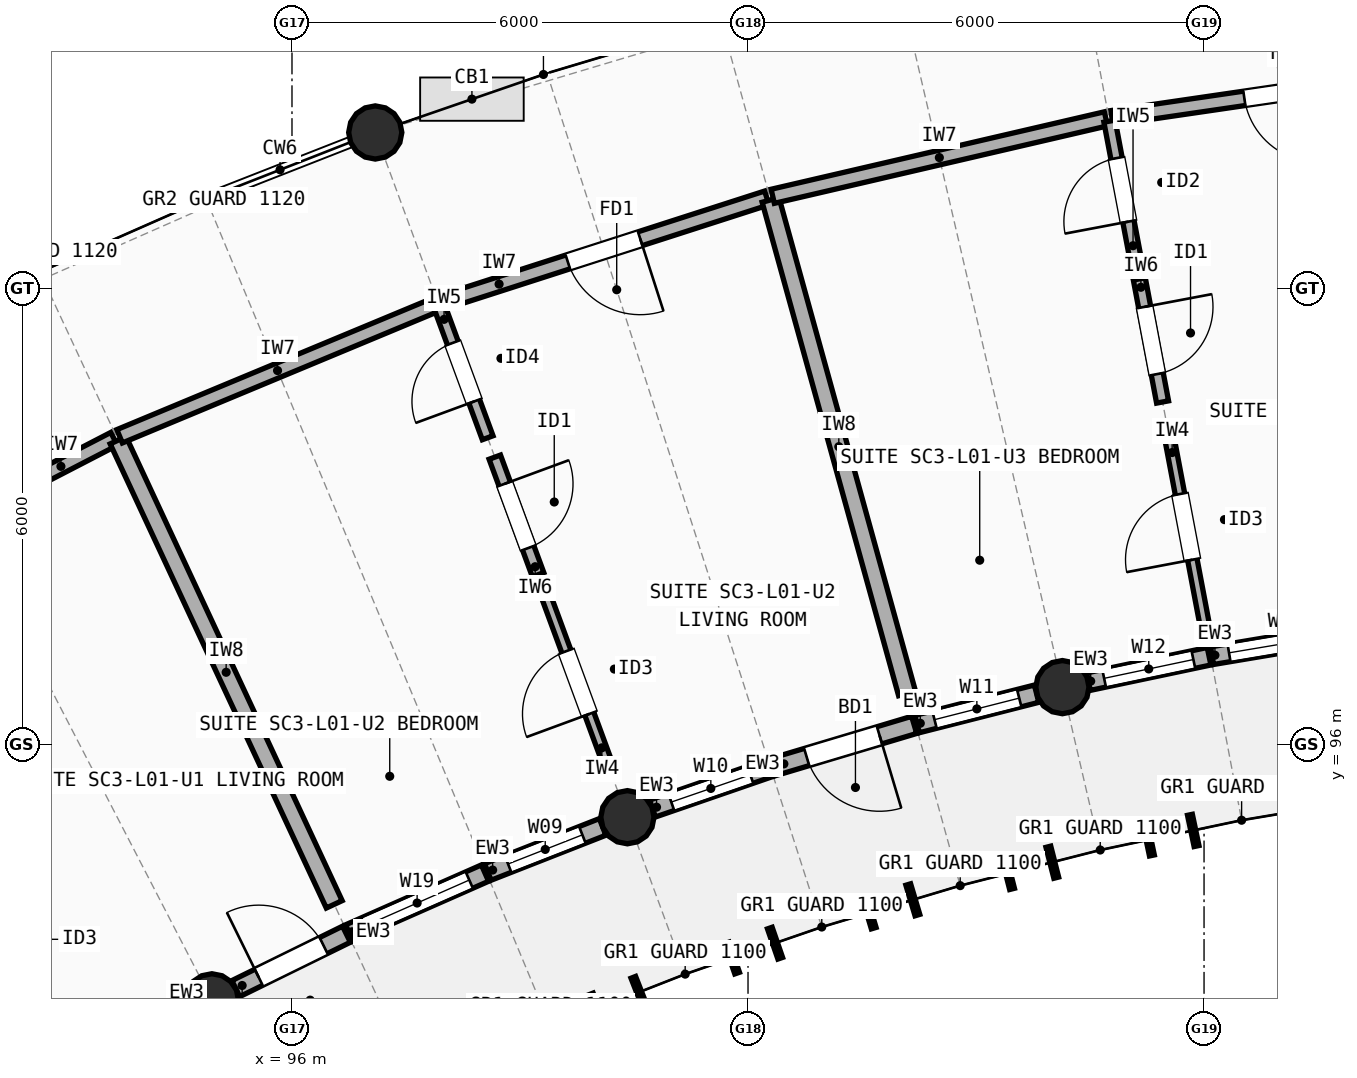
"""IFC4 building model, lengths in metres.
Left out: names, types, materials, properties, quantities, classifications, styles, units other than length and angle.
Written with IfcOpenShell. Run it as: python <this file> out.ifc"""

import sys

from ifc_helpers import new_model, si_unit, direction, frame, frame_2d, origin, origin_2d, place, context, subcontext, project, spatial, rectangle, circle, extrude, element, fill, save


model = new_model("IFC4")
c1 = context("Model", 3, precision=1e-05, world=origin(), true_north=direction((0.0, 1.0)))
c2 = subcontext(c1, "Body", "Model", "MODEL_VIEW")
j1 = project(units=[si_unit("LENGTHUNIT", "METRE"), si_unit("PLANEANGLEUNIT", "RADIAN")], contexts=[c1])
p1 = place(None, origin())
s1 = spatial("IfcSite", under=j1, at=p1, CompositionType="ELEMENT")
p2 = place(p1, origin())
s2 = spatial("IfcBuilding", under=s1, at=p2, CompositionType="ELEMENT")
p3 = place(p2, frame((0.0, 0.0, 4.5)))
s3 = spatial("IfcBuildingStorey", under=s2, at=p3, CompositionType="ELEMENT", Elevation=4.5)
for number, where, z_axis, x_axis in (
    (1, (94.947, 92.634, 0.0), (0.0, 0.0, 1.0), (1.0, 0.0, 0.0)),
    (2, (100.413, 95.043, 0.0), (0.0, 0.0, 1.0), (1.0, 0.0, 0.0)),
    (3, (97.095, 104.052, 0.0), (0.0, 0.0, 1.0), (1.0, 0.0, 0.0)),
    (4, (106.136, 96.754, 0.0), (0.0, 0.0, 1.0), (1.0, 0.0, 0.0)),
):
    element("IfcColumn", number, at=place(p3, frame(where, z_axis=z_axis, x_axis=x_axis)), inside=s3, PredefinedType="COLUMN", context=c2, shape_type="SweptSolid", body=[
        extrude(circle(Radius=0.35, at=origin_2d()), origin(), (0.0, 0.0, 1.0), 2.948),
    ])
p4 = place(p3, frame((95.261, 92.788, 0.0), z_axis=(0.0, 0.0, 1.0), x_axis=(0.897535518759, 0.440942164649, 0.0)))
e5 = element("IfcWall", 5, at=p4, inside=s3, PredefinedType="STANDARD", context=c2, shape_type="SweptSolid", body=[
    extrude(rectangle(XDim=1.622, YDim=0.235, at=frame_2d((0.811, 0.0))), origin(), (0.0, 0.0, 1.0), 2.684),
])
p5 = place(p4, frame((0.336, 0.0, 0.0)))
e6 = element("IfcOpeningElement", 6, at=p5, cuts=e5, PredefinedType="OPENING", context=c2, shape_type="SweptSolid", body=[
    extrude(rectangle(XDim=0.95, YDim=2.12, at=frame_2d((0.475, 1.06))), frame((0.0, 0.127, 0.0), z_axis=(0.0, -1.0, 0.0), x_axis=(1.0, 0.0, 0.0)), (0.0, 0.0, 1.0), 0.255),
])
p6 = place(p3, frame((96.753, 93.521, 0.0), z_axis=(0.0, 0.0, 1.0), x_axis=(0.915126852478, 0.403166025197, 0.0)))
e7 = element("IfcWall", 7, at=p6, inside=s3, PredefinedType="STANDARD", context=c2, shape_type="SweptSolid", body=[
    extrude(rectangle(XDim=1.952, YDim=0.235, at=frame_2d((0.976, 0.0))), origin(), (0.0, 0.0, 1.0), 2.684),
])
p7 = place(p6, frame((0.226, 0.0, 0.85)))
e8 = element("IfcOpeningElement", 8, at=p7, cuts=e7, PredefinedType="OPENING", context=c2, shape_type="SweptSolid", body=[
    extrude(rectangle(XDim=1.5, YDim=1.5, at=frame_2d((0.75, 0.75))), frame((0.0, 0.127, 0.0), z_axis=(0.0, -1.0, 0.0), x_axis=(1.0, 0.0, 0.0)), (0.0, 0.0, 1.0), 0.255),
])
p8 = place(p3, frame((98.577, 94.323, 0.0), z_axis=(0.0, 0.0, 1.0), x_axis=(0.930967180533, 0.365102874228, 0.0)))
e9 = element("IfcWall", 9, at=p8, inside=s3, PredefinedType="STANDARD", context=c2, shape_type="SweptSolid", body=[
    extrude(rectangle(XDim=1.622, YDim=0.235, at=frame_2d((0.811, 0.0))), origin(), (0.0, 0.0, 1.0), 2.684),
])
p9 = place(p8, frame((0.286, 0.0, 0.85)))
e10 = element("IfcOpeningElement", 10, at=p9, cuts=e9, PredefinedType="OPENING", context=c2, shape_type="SweptSolid", body=[
    extrude(rectangle(XDim=1.05, YDim=1.35, at=frame_2d((0.525, 0.675))), frame((0.0, 0.127, 0.0), z_axis=(0.0, -1.0, 0.0), x_axis=(1.0, 0.0, 0.0)), (0.0, 0.0, 1.0), 0.255),
])
p10 = place(p3, frame((100.744, 95.157, 0.0), z_axis=(0.0, 0.0, 1.0), x_axis=(0.945336194352, 0.32609734689, 0.0)))
e11 = element("IfcWall", 11, at=p10, inside=s3, PredefinedType="STANDARD", context=c2, shape_type="SweptSolid", body=[
    extrude(rectangle(XDim=1.622, YDim=0.235, at=frame_2d((0.811, 0.0))), origin(), (0.0, 0.0, 1.0), 2.684),
])
p11 = place(p10, frame((0.261, 0.0, 0.85)))
e12 = element("IfcOpeningElement", 12, at=p11, cuts=e11, PredefinedType="OPENING", context=c2, shape_type="SweptSolid", body=[
    extrude(rectangle(XDim=1.1, YDim=1.45, at=frame_2d((0.55, 0.725))), frame((0.0, 0.127, 0.0), z_axis=(0.0, -1.0, 0.0), x_axis=(1.0, 0.0, 0.0)), (0.0, 0.0, 1.0), 0.255),
])
p12 = place(p3, frame((102.316, 95.698, 0.0), z_axis=(0.0, 0.0, 1.0), x_axis=(0.95807718441, 0.286510224446, 0.0)))
e13 = element("IfcWall", 13, at=p12, inside=s3, PredefinedType="STANDARD", context=c2, shape_type="SweptSolid", body=[
    extrude(rectangle(XDim=1.952, YDim=0.235, at=frame_2d((0.976, 0.0))), origin(), (0.0, 0.0, 1.0), 2.684),
])
p13 = place(p12, frame((0.476, 0.0, 0.0)))
e14 = element("IfcOpeningElement", 14, at=p13, cuts=e13, PredefinedType="OPENING", context=c2, shape_type="SweptSolid", body=[
    extrude(rectangle(XDim=1.0, YDim=2.15, at=frame_2d((0.5, 1.075))), frame((0.0, 0.127, 0.0), z_axis=(0.0, -1.0, 0.0), x_axis=(1.0, 0.0, 0.0)), (0.0, 0.0, 1.0), 0.255),
])
p14 = place(p3, frame((104.225, 96.268, 0.0), z_axis=(0.0, 0.0, 1.0), x_axis=(0.969152085663, 0.246463455413, 0.0)))
e15 = element("IfcWall", 15, at=p14, inside=s3, PredefinedType="STANDARD", context=c2, shape_type="SweptSolid", body=[
    extrude(rectangle(XDim=1.623, YDim=0.235, at=frame_2d((0.811, 0.0))), origin(), (0.0, 0.0, 1.0), 2.684),
])
p15 = place(p14, frame((0.236, 0.0, 0.85)))
e16 = element("IfcOpeningElement", 16, at=p15, cuts=e15, PredefinedType="OPENING", context=c2, shape_type="SweptSolid", body=[
    extrude(rectangle(XDim=1.15, YDim=1.45, at=frame_2d((0.575, 0.725))), frame((0.0, 0.127, 0.0), z_axis=(0.0, -1.0, 0.0), x_axis=(1.0, 0.0, 0.0)), (0.0, 0.0, 1.0), 0.255),
])
p16 = place(p3, frame((106.479, 96.826, 0.0), z_axis=(0.0, 0.0, 1.0), x_axis=(0.978514642092, 0.206177339229, 0.0)))
e17 = element("IfcWall", 17, at=p16, inside=s3, PredefinedType="STANDARD", context=c2, shape_type="SweptSolid", body=[
    extrude(rectangle(XDim=1.622, YDim=0.235, at=frame_2d((0.811, 0.0))), origin(), (0.0, 0.0, 1.0), 2.684),
])
p17 = place(p16, frame((0.211, 0.0, 0.85)))
e18 = element("IfcOpeningElement", 18, at=p17, cuts=e17, PredefinedType="OPENING", context=c2, shape_type="SweptSolid", body=[
    extrude(rectangle(XDim=1.2, YDim=1.35, at=frame_2d((0.6, 0.675))), frame((0.0, 0.127, 0.0), z_axis=(0.0, -1.0, 0.0), x_axis=(1.0, 0.0, 0.0)), (0.0, 0.0, 1.0), 0.255),
])
p18 = place(p3, frame((108.105, 97.168, 0.0), z_axis=(0.0, 0.0, 1.0), x_axis=(0.986241418229, 0.165311418144, 0.0)))
e19 = element("IfcWall", 19, at=p18, inside=s3, PredefinedType="STANDARD", context=c2, shape_type="SweptSolid", body=[
    extrude(rectangle(XDim=1.952, YDim=0.235, at=frame_2d((0.976, 0.0))), origin(), (0.0, 0.0, 1.0), 2.684),
])
p19 = place(p18, frame((0.226, 0.0, 0.85)))
e20 = element("IfcOpeningElement", 20, at=p19, cuts=e19, PredefinedType="OPENING", context=c2, shape_type="SweptSolid", body=[
    extrude(rectangle(XDim=1.5, YDim=1.4, at=frame_2d((0.75, 0.7))), frame((0.0, 0.127, 0.0), z_axis=(0.0, -1.0, 0.0), x_axis=(1.0, 0.0, 0.0)), (0.0, 0.0, 1.0), 0.255),
])
p20 = place(p3, frame((89.661, 97.953, 0.0), z_axis=(0.0, 0.0, 1.0), x_axis=(0.888203141908, 0.459450953536, 0.0)))
e21 = element("IfcWall", 21, at=p20, inside=s3, PredefinedType="SOLIDWALL", context=c2, shape_type="SweptSolid", body=[
    extrude(rectangle(XDim=4.501, YDim=0.19, at=frame_2d((2.25, 0.0))), origin(), (0.0, 0.0, 1.0), 2.722),
])
p21 = place(p20, frame((1.726, 0.0, 0.0)))
e22 = element("IfcOpeningElement", 22, at=p21, cuts=e21, PredefinedType="OPENING", context=c2, shape_type="SweptSolid", body=[
    extrude(rectangle(XDim=1.05, YDim=2.15, at=frame_2d((0.525, 1.075))), frame((0.0, 0.105, 0.0), z_axis=(0.0, -1.0, 0.0), x_axis=(1.0, 0.0, 0.0)), (0.0, 0.0, 1.0), 0.21),
])
p22 = place(p3, frame((93.034, 91.967, 0.0), z_axis=(0.0, 0.0, 1.0), x_axis=(-0.495951127449, 0.868350435701, 0.0)))
e23 = element("IfcWall", 23, at=p22, inside=s3, PredefinedType="PARTITIONING", context=c2, shape_type="SweptSolid", body=[
    extrude(rectangle(XDim=2.8, YDim=0.125, at=frame_2d((1.4, 0.0))), origin(), (0.0, 0.0, 1.0), 2.762),
])
p23 = place(p22, frame((0.96, 0.0, 0.0)))
e24 = element("IfcOpeningElement", 24, at=p23, cuts=e23, PredefinedType="OPENING", context=c2, shape_type="SweptSolid", body=[
    extrude(rectangle(XDim=0.88, YDim=2.1, at=frame_2d((0.44, 1.05))), frame((0.0, 0.073, 0.0), z_axis=(0.0, -1.0, 0.0), x_axis=(1.0, 0.0, 0.0)), (0.0, 0.0, 1.0), 0.145),
])
p24 = place(p3, frame((96.556, 93.897, 0.0), z_axis=(0.0, 0.0, 1.0), x_axis=(-0.422206763189, 0.906499558256, 0.0)))
e25 = element("IfcWall", 25, at=p24, inside=s3, PredefinedType="SOLIDWALL", context=c2, shape_type="SweptSolid", body=[
    extrude(rectangle(XDim=6.736, YDim=0.23, at=frame_2d((3.368, 0.0))), origin(), (0.0, 0.0, 1.0), 2.742),
])
p25 = place(p3, frame((93.732, 100.055, 0.0), z_axis=(0.0, 0.0, 1.0), x_axis=(0.923267760269, 0.384157054925, 0.0)))
e26 = element("IfcWall", 26, at=p25, inside=s3, PredefinedType="SOLIDWALL", context=c2, shape_type="SweptSolid", body=[
    extrude(rectangle(XDim=4.501, YDim=0.19, at=frame_2d((2.251, 0.0))), origin(), (0.0, 0.0, 1.0), 2.762),
])
p26 = place(p3, frame((97.963, 101.812, 0.0), z_axis=(0.0, 0.0, 1.0), x_axis=(0.95193992138, 0.306284812035, 0.0)))
e27 = element("IfcWall", 27, at=p26, inside=s3, PredefinedType="SOLIDWALL", context=c2, shape_type="SweptSolid", body=[
    extrude(rectangle(XDim=4.501, YDim=0.19, at=frame_2d((2.25, 0.0))), origin(), (0.0, 0.0, 1.0), 2.742),
])
p27 = place(p26, frame((1.751, 0.0, 0.0)))
e28 = element("IfcOpeningElement", 28, at=p27, cuts=e27, PredefinedType="OPENING", context=c2, shape_type="SweptSolid", body=[
    extrude(rectangle(XDim=1.0, YDim=2.15, at=frame_2d((0.5, 1.075))), frame((0.0, 0.105, 0.0), z_axis=(0.0, -1.0, 0.0), x_axis=(1.0, 0.0, 0.0)), (0.0, 0.0, 1.0), 0.21),
])
p28 = place(p3, frame((100.189, 95.651, 0.0), z_axis=(0.0, 0.0, 1.0), x_axis=(-0.34555023948, 0.938400251489, 0.0)))
e29 = element("IfcWall", 29, at=p28, inside=s3, PredefinedType="PARTITIONING", context=c2, shape_type="SweptSolid", body=[
    extrude(rectangle(XDim=2.48, YDim=0.125, at=frame_2d((1.24, 0.0))), origin(), (0.0, 0.0, 1.0), 2.722),
])
p29 = place(p28, frame((0.8, 0.0, 0.0)))
e30 = element("IfcOpeningElement", 30, at=p29, cuts=e29, PredefinedType="OPENING", context=c2, shape_type="SweptSolid", body=[
    extrude(rectangle(XDim=0.88, YDim=2.1, at=frame_2d((0.44, 1.05))), frame((0.0, 0.073, 0.0), z_axis=(0.0, -1.0, 0.0), x_axis=(1.0, 0.0, 0.0)), (0.0, 0.0, 1.0), 0.145),
])
p30 = place(p3, frame((99.238, 98.233, 0.0), z_axis=(0.0, 0.0, 1.0), x_axis=(-0.345581795697, 0.938388630836, 0.0)))
e31 = element("IfcWall", 31, at=p30, inside=s3, PredefinedType="PLUMBINGWALL", context=c2, shape_type="SweptSolid", body=[
    extrude(rectangle(XDim=1.648, YDim=0.16, at=frame_2d((0.824, 0.0))), origin(), (0.0, 0.0, 1.0), 2.722),
])
p31 = place(p30, frame((0.374, 0.0, 0.0)))
e32 = element("IfcOpeningElement", 32, at=p31, cuts=e31, PredefinedType="OPENING", context=c2, shape_type="SweptSolid", body=[
    extrude(rectangle(XDim=0.9, YDim=2.1, at=frame_2d((0.45, 1.05))), frame((0.0, 0.09, 0.0), z_axis=(0.0, -1.0, 0.0), x_axis=(1.0, 0.0, 0.0)), (0.0, 0.0, 1.0), 0.18),
])
p32 = place(p3, frame((98.574, 100.035, 0.0), z_axis=(0.0, 0.0, 1.0), x_axis=(-0.345490154584, 0.938422374566, 0.0)))
e33 = element("IfcWall", 33, at=p32, inside=s3, PredefinedType="PARTITIONING", context=c2, shape_type="SweptSolid", body=[
    extrude(rectangle(XDim=1.84, YDim=0.15, at=frame_2d((0.92, 0.0))), origin(), (0.0, 0.0, 1.0), 2.722),
])
p33 = place(p32, frame((0.51, 0.0, 0.0)))
e34 = element("IfcOpeningElement", 34, at=p33, cuts=e33, PredefinedType="OPENING", context=c2, shape_type="SweptSolid", body=[
    extrude(rectangle(XDim=0.82, YDim=2.08, at=frame_2d((0.41, 1.04))), frame((0.0, 0.085, 0.0), z_axis=(0.0, -1.0, 0.0), x_axis=(1.0, 0.0, 0.0)), (0.0, 0.0, 1.0), 0.17),
])
p34 = place(p3, frame((104.092, 96.672, 0.0), z_axis=(0.0, 0.0, 1.0), x_axis=(-0.266578174631, 0.963813299768, 0.0)))
e35 = element("IfcWall", 35, at=p34, inside=s3, PredefinedType="SOLIDWALL", context=c2, shape_type="SweptSolid", body=[
    extrude(rectangle(XDim=6.736, YDim=0.23, at=frame_2d((3.368, 0.0))), origin(), (0.0, 0.0, 1.0), 2.762),
])
p35 = place(p3, frame((102.325, 103.212, 0.0), z_axis=(0.0, 0.0, 1.0), x_axis=(0.974052809246, 0.226320844821, 0.0)))
e36 = element("IfcWall", 36, at=p35, inside=s3, PredefinedType="SOLIDWALL", context=c2, shape_type="SweptSolid", body=[
    extrude(rectangle(XDim=4.501, YDim=0.19, at=frame_2d((2.251, 0.0))), origin(), (0.0, 0.0, 1.0), 2.722),
])
p36 = place(p3, frame((106.788, 104.246, 0.0), z_axis=(0.0, 0.0, 1.0), x_axis=(0.98946769641, 0.14475385232, 0.0)))
e37 = element("IfcWall", 37, at=p36, inside=s3, PredefinedType="SOLIDWALL", context=c2, shape_type="SweptSolid", body=[
    extrude(rectangle(XDim=4.501, YDim=0.19, at=frame_2d((2.251, 0.0))), origin(), (0.0, 0.0, 1.0), 2.762),
])
p37 = place(p36, frame((1.761, 0.0, 0.0)))
e38 = element("IfcOpeningElement", 38, at=p37, cuts=e37, PredefinedType="OPENING", context=c2, shape_type="SweptSolid", body=[
    extrude(rectangle(XDim=0.98, YDim=2.15, at=frame_2d((0.49, 1.075))), frame((0.0, 0.105, 0.0), z_axis=(0.0, -1.0, 0.0), x_axis=(1.0, 0.0, 0.0)), (0.0, 0.0, 1.0), 0.21),
])
p38 = place(p3, frame((108.025, 97.487, 0.0), z_axis=(0.0, 0.0, 1.0), x_axis=(-0.185725576604, 0.982601653874, 0.0)))
e39 = element("IfcWall", 39, at=p38, inside=s3, PredefinedType="PARTITIONING", context=c2, shape_type="SweptSolid", body=[
    extrude(rectangle(XDim=2.8, YDim=0.125, at=frame_2d((1.4, 0.0))), origin(), (0.0, 0.0, 1.0), 2.742),
])
p39 = place(p38, frame((0.96, 0.0, 0.0)))
e40 = element("IfcOpeningElement", 40, at=p39, cuts=e39, PredefinedType="OPENING", context=c2, shape_type="SweptSolid", body=[
    extrude(rectangle(XDim=0.88, YDim=2.1, at=frame_2d((0.44, 1.05))), frame((0.0, 0.073, 0.0), z_axis=(0.0, -1.0, 0.0), x_axis=(1.0, 0.0, 0.0)), (0.0, 0.0, 1.0), 0.145),
])
p40 = place(p3, frame((107.454, 100.506, 0.0), z_axis=(0.0, 0.0, 1.0), x_axis=(-0.185764109712, 0.98259436979, 0.0)))
e41 = element("IfcWall", 41, at=p40, inside=s3, PredefinedType="PLUMBINGWALL", context=c2, shape_type="SweptSolid", body=[
    extrude(rectangle(XDim=1.648, YDim=0.16, at=frame_2d((0.824, 0.0))), origin(), (0.0, 0.0, 1.0), 2.742),
])
p41 = place(p40, frame((0.374, 0.0, 0.0)))
e42 = element("IfcOpeningElement", 42, at=p41, cuts=e41, PredefinedType="OPENING", context=c2, shape_type="SweptSolid", body=[
    extrude(rectangle(XDim=0.9, YDim=2.1, at=frame_2d((0.45, 1.05))), frame((0.0, 0.09, 0.0), z_axis=(0.0, -1.0, 0.0), x_axis=(1.0, 0.0, 0.0)), (0.0, 0.0, 1.0), 0.18),
])
p42 = place(p3, frame((107.098, 102.392, 0.0), z_axis=(0.0, 0.0, 1.0), x_axis=(-0.185746265255, 0.982597743201, 0.0)))
e43 = element("IfcWall", 43, at=p42, inside=s3, PredefinedType="PARTITIONING", context=c2, shape_type="SweptSolid", body=[
    extrude(rectangle(XDim=1.84, YDim=0.15, at=frame_2d((0.92, 0.0))), origin(), (0.0, 0.0, 1.0), 2.742),
])
p43 = place(p42, frame((0.495, 0.0, 0.0)))
e44 = element("IfcOpeningElement", 44, at=p43, cuts=e43, PredefinedType="OPENING", context=c2, shape_type="SweptSolid", body=[
    extrude(rectangle(XDim=0.85, YDim=2.1, at=frame_2d((0.425, 1.05))), frame((0.0, 0.085, 0.0), z_axis=(0.0, -1.0, 0.0), x_axis=(1.0, 0.0, 0.0)), (0.0, 0.0, 1.0), 0.17),
])
p44 = place(p5, frame((0.95, 0.0, 0.0), z_axis=(0.0, 0.0, 1.0), x_axis=(-1.0, 0.0, 0.0)))
e45 = element("IfcDoor", 45, at=p44, inside=s3, OperationType="SINGLE_SWING_LEFT", PredefinedType="DOOR", context=c2, shape_type="SweptSolid", body=[
    extrude(rectangle(XDim=0.95, YDim=2.12, at=frame_2d((0.475, 1.06))), frame((0.0, 0.025, 0.0), z_axis=(0.0, -1.0, 0.0), x_axis=(1.0, 0.0, 0.0)), (0.0, 0.0, 1.0), 0.05),
])
fill(e6, e45)
p45 = place(p7, origin())
e46 = element("IfcWindow", 46, at=p45, inside=s3, PartitioningType="SINGLE_PANEL", PredefinedType="WINDOW", context=c2, shape_type="SweptSolid", body=[
    extrude(rectangle(XDim=1.5, YDim=1.5, at=frame_2d((0.75, 0.75))), frame((0.0, 0.03, 0.0), z_axis=(0.0, -1.0, 0.0), x_axis=(1.0, 0.0, 0.0)), (0.0, 0.0, 1.0), 0.06),
])
fill(e8, e46)
p46 = place(p9, origin())
e47 = element("IfcWindow", 47, at=p46, inside=s3, PartitioningType="SINGLE_PANEL", PredefinedType="WINDOW", context=c2, shape_type="SweptSolid", body=[
    extrude(rectangle(XDim=1.05, YDim=1.35, at=frame_2d((0.525, 0.675))), frame((0.0, 0.03, 0.0), z_axis=(0.0, -1.0, 0.0), x_axis=(1.0, 0.0, 0.0)), (0.0, 0.0, 1.0), 0.06),
])
fill(e10, e47)
p47 = place(p11, origin())
e48 = element("IfcWindow", 48, at=p47, inside=s3, PartitioningType="SINGLE_PANEL", PredefinedType="WINDOW", context=c2, shape_type="SweptSolid", body=[
    extrude(rectangle(XDim=1.1, YDim=1.45, at=frame_2d((0.55, 0.725))), frame((0.0, 0.03, 0.0), z_axis=(0.0, -1.0, 0.0), x_axis=(1.0, 0.0, 0.0)), (0.0, 0.0, 1.0), 0.06),
])
fill(e12, e48)
p48 = place(p13, frame((1.0, 0.0, 0.0), z_axis=(0.0, 0.0, 1.0), x_axis=(-1.0, 0.0, 0.0)))
e49 = element("IfcDoor", 49, at=p48, inside=s3, OperationType="SINGLE_SWING_RIGHT", PredefinedType="DOOR", context=c2, shape_type="SweptSolid", body=[
    extrude(rectangle(XDim=1.0, YDim=2.15, at=frame_2d((0.5, 1.075))), frame((0.0, 0.025, 0.0), z_axis=(0.0, -1.0, 0.0), x_axis=(1.0, 0.0, 0.0)), (0.0, 0.0, 1.0), 0.05),
])
fill(e14, e49)
p49 = place(p15, origin())
e50 = element("IfcWindow", 50, at=p49, inside=s3, PartitioningType="SINGLE_PANEL", PredefinedType="WINDOW", context=c2, shape_type="SweptSolid", body=[
    extrude(rectangle(XDim=1.15, YDim=1.45, at=frame_2d((0.575, 0.725))), frame((0.0, 0.03, 0.0), z_axis=(0.0, -1.0, 0.0), x_axis=(1.0, 0.0, 0.0)), (0.0, 0.0, 1.0), 0.06),
])
fill(e16, e50)
p50 = place(p17, origin())
e51 = element("IfcWindow", 51, at=p50, inside=s3, PartitioningType="SINGLE_PANEL", PredefinedType="WINDOW", context=c2, shape_type="SweptSolid", body=[
    extrude(rectangle(XDim=1.2, YDim=1.35, at=frame_2d((0.6, 0.675))), frame((0.0, 0.03, 0.0), z_axis=(0.0, -1.0, 0.0), x_axis=(1.0, 0.0, 0.0)), (0.0, 0.0, 1.0), 0.06),
])
fill(e18, e51)
p51 = place(p19, origin())
e52 = element("IfcWindow", 52, at=p51, inside=s3, PartitioningType="SINGLE_PANEL", PredefinedType="WINDOW", context=c2, shape_type="SweptSolid", body=[
    extrude(rectangle(XDim=1.5, YDim=1.4, at=frame_2d((0.75, 0.7))), frame((0.0, 0.03, 0.0), z_axis=(0.0, -1.0, 0.0), x_axis=(1.0, 0.0, 0.0)), (0.0, 0.0, 1.0), 0.06),
])
fill(e20, e52)
p52 = place(p27, origin())
e53 = element("IfcDoor", 53, at=p52, inside=s3, OperationType="SINGLE_SWING_RIGHT", PredefinedType="DOOR", context=c2, shape_type="SweptSolid", body=[
    extrude(rectangle(XDim=1.0, YDim=2.15, at=frame_2d((0.5, 1.075))), frame((0.0, 0.025, 0.0), z_axis=(0.0, -1.0, 0.0), x_axis=(1.0, 0.0, 0.0)), (0.0, 0.0, 1.0), 0.05),
])
fill(e28, e53)
p53 = place(p29, origin())
e54 = element("IfcDoor", 54, at=p53, inside=s3, OperationType="SINGLE_SWING_LEFT", PredefinedType="DOOR", context=c2, shape_type="SweptSolid", body=[
    extrude(rectangle(XDim=0.88, YDim=2.1, at=frame_2d((0.44, 1.05))), frame((0.0, 0.025, 0.0), z_axis=(0.0, -1.0, 0.0), x_axis=(1.0, 0.0, 0.0)), (0.0, 0.0, 1.0), 0.05),
])
fill(e30, e54)
p54 = place(p31, origin())
e55 = element("IfcDoor", 55, at=p54, inside=s3, OperationType="SINGLE_SWING_RIGHT", PredefinedType="DOOR", context=c2, shape_type="SweptSolid", body=[
    extrude(rectangle(XDim=0.9, YDim=2.1, at=frame_2d((0.45, 1.05))), frame((0.0, 0.025, 0.0), z_axis=(0.0, -1.0, 0.0), x_axis=(1.0, 0.0, 0.0)), (0.0, 0.0, 1.0), 0.05),
])
fill(e32, e55)
p55 = place(p33, origin())
e56 = element("IfcDoor", 56, at=p55, inside=s3, OperationType="SINGLE_SWING_LEFT", PredefinedType="DOOR", context=c2, shape_type="SweptSolid", body=[
    extrude(rectangle(XDim=0.82, YDim=2.08, at=frame_2d((0.41, 1.04))), frame((0.0, 0.025, 0.0), z_axis=(0.0, -1.0, 0.0), x_axis=(1.0, 0.0, 0.0)), (0.0, 0.0, 1.0), 0.05),
])
fill(e34, e56)
p56 = place(p37, origin())
e57 = element("IfcDoor", 57, at=p56, inside=s3, OperationType="SINGLE_SWING_RIGHT", PredefinedType="DOOR", context=c2, shape_type="SweptSolid", body=[
    extrude(rectangle(XDim=0.98, YDim=2.15, at=frame_2d((0.49, 1.075))), frame((0.0, 0.025, 0.0), z_axis=(0.0, -1.0, 0.0), x_axis=(1.0, 0.0, 0.0)), (0.0, 0.0, 1.0), 0.05),
])
fill(e38, e57)
p57 = place(p39, origin())
e58 = element("IfcDoor", 58, at=p57, inside=s3, OperationType="SINGLE_SWING_LEFT", PredefinedType="DOOR", context=c2, shape_type="SweptSolid", body=[
    extrude(rectangle(XDim=0.88, YDim=2.1, at=frame_2d((0.44, 1.05))), frame((0.0, 0.025, 0.0), z_axis=(0.0, -1.0, 0.0), x_axis=(1.0, 0.0, 0.0)), (0.0, 0.0, 1.0), 0.05),
])
fill(e40, e58)
p58 = place(p41, origin())
e59 = element("IfcDoor", 59, at=p58, inside=s3, OperationType="SINGLE_SWING_RIGHT", PredefinedType="DOOR", context=c2, shape_type="SweptSolid", body=[
    extrude(rectangle(XDim=0.9, YDim=2.1, at=frame_2d((0.45, 1.05))), frame((0.0, 0.025, 0.0), z_axis=(0.0, -1.0, 0.0), x_axis=(1.0, 0.0, 0.0)), (0.0, 0.0, 1.0), 0.05),
])
fill(e42, e59)
p59 = place(p43, origin())
e60 = element("IfcDoor", 60, at=p59, inside=s3, OperationType="SINGLE_SWING_LEFT", PredefinedType="DOOR", context=c2, shape_type="SweptSolid", body=[
    extrude(rectangle(XDim=0.85, YDim=2.1, at=frame_2d((0.425, 1.05))), frame((0.0, 0.025, 0.0), z_axis=(0.0, -1.0, 0.0), x_axis=(1.0, 0.0, 0.0)), (0.0, 0.0, 1.0), 0.05),
])
fill(e44, e60)
save(model, sys.argv[1])
